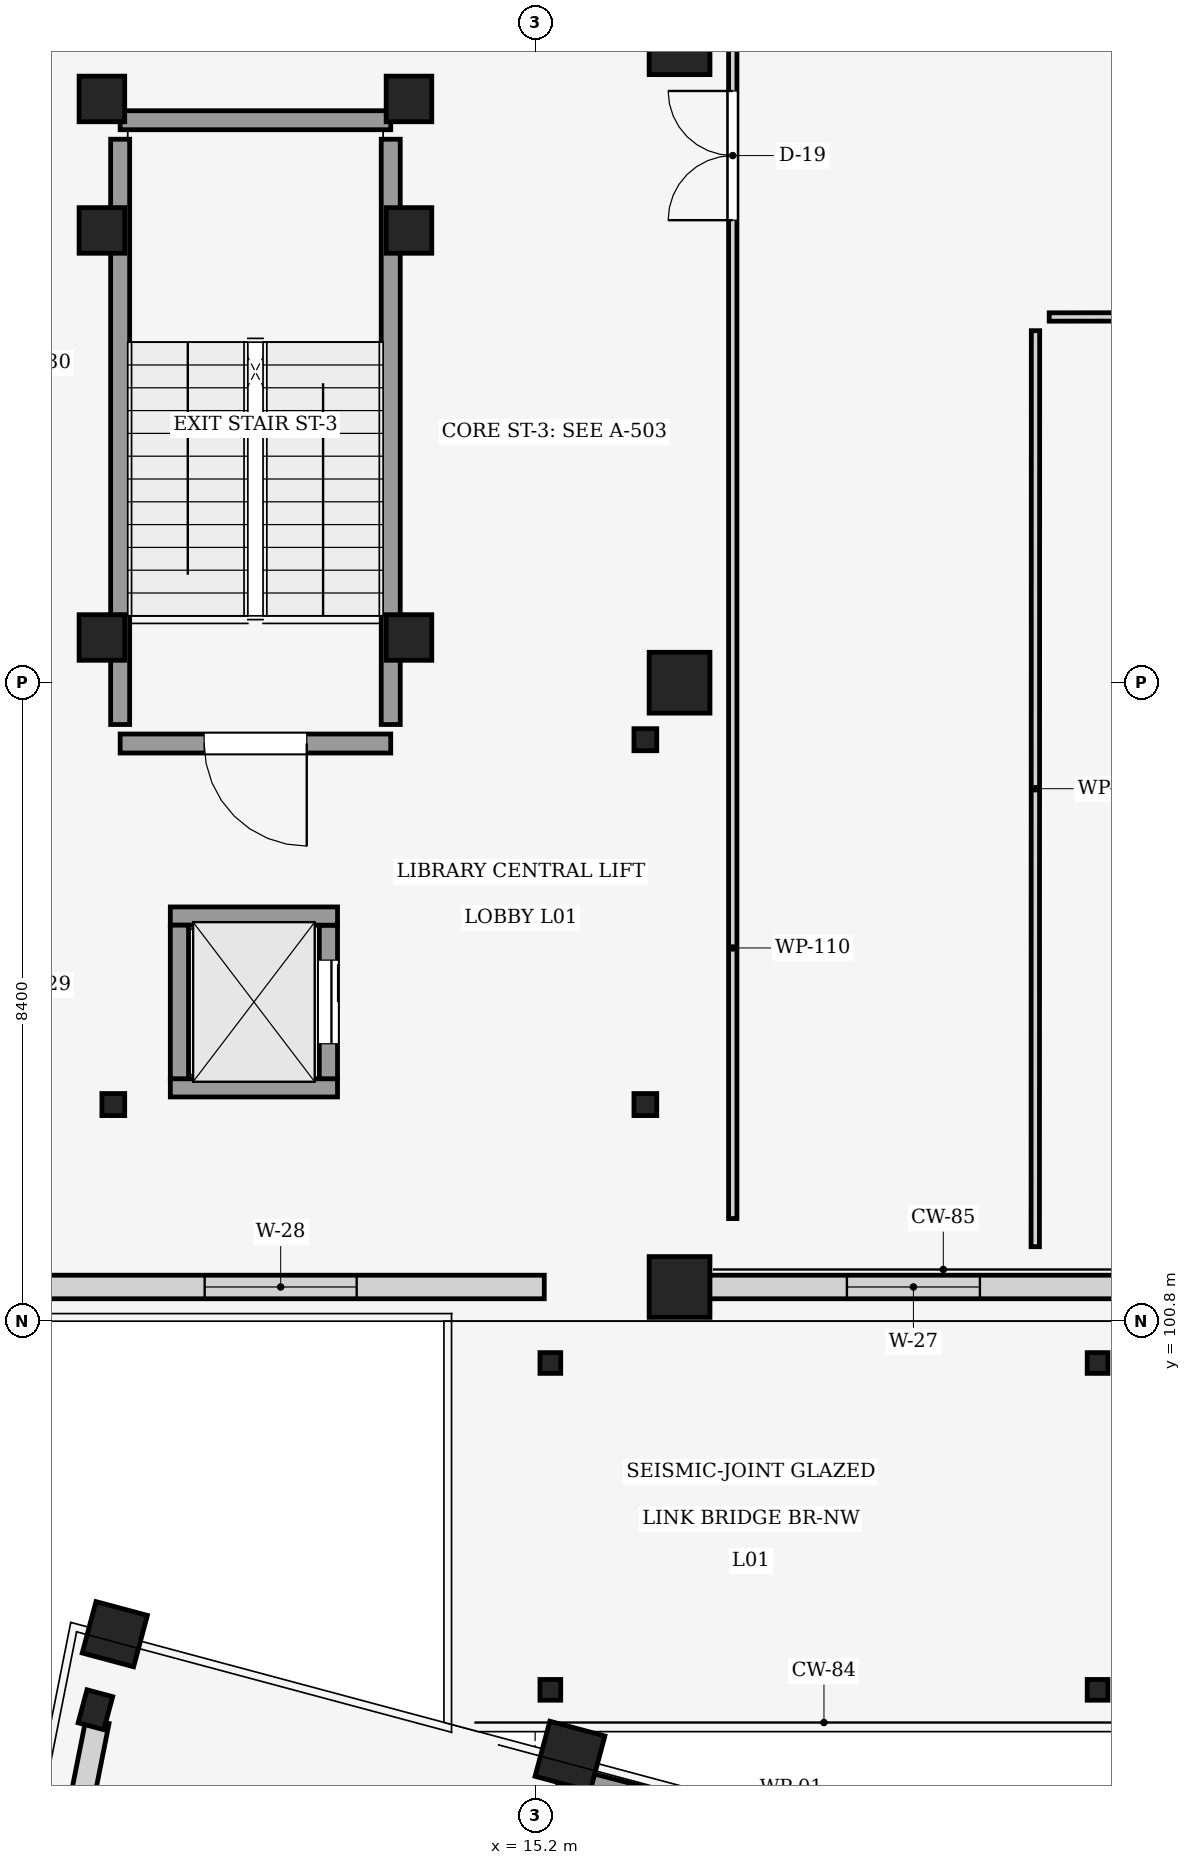
"""IFC4 building model, lengths in metres.
Left out: names, types, materials, properties, quantities, classifications, styles, units other than length and angle.
Written with IfcOpenShell. Run it as: python <this file> out.ifc"""

import sys

from ifc_helpers import new_model, si_unit, direction, frame, frame_2d, origin, origin_2d, place, context, subcontext, project, spatial, rectangle, circle, hollow_circle, i_section, extrude, element, fill, save


model = new_model("IFC4")
c1 = context("Model", 3, precision=1e-05, world=origin(), true_north=direction((0.0, 1.0)))
c2 = subcontext(c1, "Body", "Model", "MODEL_VIEW")
j1 = project(units=[si_unit("LENGTHUNIT", "METRE"), si_unit("PLANEANGLEUNIT", "RADIAN")], contexts=[c1])
p1 = place(None, origin())
s1 = spatial("IfcSite", under=j1, at=p1, CompositionType="ELEMENT")
p2 = place(p1, origin())
s2 = spatial("IfcBuilding", under=s1, at=p2, CompositionType="ELEMENT")
p3 = place(p2, frame((0.0, 0.0, 5.1)))
s3 = spatial("IfcBuildingStorey", under=s2, at=p3, CompositionType="ELEMENT", Elevation=5.1)
p4 = place(p3, frame((15.658, 95.077, 0.0), z_axis=(0.0, 0.0, 1.0), x_axis=(-0.965925826289, 0.258819045103, 0.0)))
e1 = element("IfcColumn", 1, at=p4, inside=s3, PredefinedType="COLUMN", context=c2, shape_type="SweptSolid", body=[
    extrude(circle(Radius=0.375, at=origin_2d()), origin(), (0.0, 0.0, 1.0), 4.05),
])
p5 = place(p3, frame((9.67, 96.682, 0.0), z_axis=(0.0, 0.0, 1.0), x_axis=(-0.965925826289, 0.258819045103, 0.0)))
e2 = element("IfcColumn", 2, at=p5, inside=s3, PredefinedType="COLUMN", context=c2, shape_type="SweptSolid", body=[
    extrude(rectangle(XDim=0.7, YDim=0.7, at=origin_2d()), origin(), (0.0, 0.0, 1.0), 4.05),
])
p6 = place(p3, frame((9.414, 95.688, 0.0), z_axis=(0.0, 0.0, 1.0), x_axis=(-0.965925826289, 0.258819045103, 0.0)))
e3 = element("IfcColumn", 3, at=p6, inside=s3, PredefinedType="PILASTER", context=c2, shape_type="SweptSolid", body=[
    extrude(rectangle(XDim=0.35, YDim=0.45, at=origin_2d()), origin(), (0.0, 0.0, 1.0), 4.05),
])
for number, where, z_axis, x_axis in (
    (4, (17.1, 101.25, 0.0), (0.0, 0.0, 1.0), (1.0, 0.0, 0.0)),
    (5, (17.1, 109.2, 0.0), (0.0, 0.0, 1.0), (1.0, 0.0, 0.0)),
    (6, (17.1, 117.6, 0.0), (0.0, 0.0, 1.0), (1.0, 0.0, 0.0)),
):
    element("IfcColumn", number, at=place(p3, frame(where, z_axis=z_axis, x_axis=x_axis)), inside=s3, PredefinedType="COLUMN", context=c2, shape_type="SweptSolid", body=[
        extrude(rectangle(XDim=0.8, YDim=0.8, at=origin_2d()), origin(), (0.0, 0.0, 1.0), 4.05),
    ])
for number, where, z_axis, x_axis in (
    (7, (15.4, 95.95, 0.0), (0.0, 0.0, 1.0), (1.0, 0.0, 0.0)),
    (8, (22.6, 95.95, 0.0), (0.0, 0.0, 1.0), (1.0, 0.0, 0.0)),
    (9, (22.6, 100.25, 0.0), (0.0, 0.0, 1.0), (1.0, 0.0, 0.0)),
    (10, (15.4, 100.25, 0.0), (0.0, 0.0, 1.0), (1.0, 0.0, 0.0)),
):
    element("IfcColumn", number, at=place(p3, frame(where, z_axis=z_axis, x_axis=x_axis)), inside=s3, PredefinedType="COLUMN", context=c2, shape_type="SweptSolid", body=[
        extrude(hollow_circle(Radius=0.136, WallThickness=0.016, at=origin_2d()), origin(), (0.0, 0.0, 1.0), 3.82),
    ])
for number, where, z_axis, x_axis in (
    (11, (13.54, 109.795, 0.0), (0.0, 0.0, 1.0), (1.0, 0.0, 0.0)),
    (12, (9.5, 109.795, 0.0), (0.0, 0.0, 1.0), (1.0, 0.0, 0.0)),
    (13, (13.54, 115.15, 0.0), (0.0, 0.0, 1.0), (1.0, 0.0, 0.0)),
    (14, (9.5, 115.15, 0.0), (0.0, 0.0, 1.0), (1.0, 0.0, 0.0)),
    (15, (13.54, 116.88, 0.0), (0.0, 0.0, 1.0), (1.0, 0.0, 0.0)),
    (16, (9.5, 116.88, 0.0), (0.0, 0.0, 1.0), (1.0, 0.0, 0.0)),
):
    element("IfcColumn", number, at=place(p3, frame(where, z_axis=z_axis, x_axis=x_axis)), inside=s3, PredefinedType="COLUMN", context=c2, shape_type="SweptSolid", body=[
        extrude(rectangle(XDim=0.6, YDim=0.6, at=origin_2d()), origin(), (0.0, 0.0, 1.0), 4.05),
    ])
for number, where, z_axis, x_axis in (
    (17, (9.65, 103.65, 0.0), (0.0, 0.0, 1.0), (1.0, 0.0, 0.0)),
    (18, (16.65, 103.65, 0.0), (0.0, 0.0, 1.0), (1.0, 0.0, 0.0)),
    (19, (16.65, 108.45, 0.0), (0.0, 0.0, 1.0), (1.0, 0.0, 0.0)),
):
    element("IfcColumn", number, at=place(p3, frame(where, z_axis=z_axis, x_axis=x_axis)), inside=s3, PredefinedType="COLUMN", context=c2, shape_type="SweptSolid", body=[
        extrude(i_section(OverallWidth=0.3, OverallDepth=0.29, WebThickness=0.009, FlangeThickness=0.014, at=origin_2d()), origin(), (0.0, 0.0, 1.0), 4.05),
    ])
p7 = place(p3, frame((8.476, 90.681, 0.0), z_axis=(0.0, 0.0, 1.0), x_axis=(0.195073176628, 0.980788690677, 0.0)))
e20 = element("IfcWall", 20, at=p7, inside=s3, PredefinedType="STANDARD", context=c2, shape_type="SweptSolid", body=[
    extrude(rectangle(XDim=4.952, YDim=0.31, at=frame_2d((2.476, 0.0))), origin(), (0.0, 0.0, 1.0), 3.145),
])
p8 = place(p7, frame((1.626, 0.0, 0.85)))
e21 = element("IfcOpeningElement", 21, at=p8, cuts=e20, PredefinedType="OPENING", context=c2, shape_type="SweptSolid", body=[
    extrude(rectangle(XDim=1.7, YDim=1.35, at=frame_2d((0.85, 0.675))), frame((0.0, 0.165, 0.0), z_axis=(0.0, -1.0, 0.0), x_axis=(1.0, 0.0, 0.0)), (0.0, 0.0, 1.0), 0.33),
])
p9 = place(p3, frame((15.515, 94.768, 0.0), z_axis=(0.0, 0.0, 1.0), x_axis=(0.967930025072, -0.251219956541, 0.0)))
e22 = element("IfcWall", 22, at=p9, inside=s3, PredefinedType="SHEAR", context=c2, shape_type="SweptSolid", body=[
    extrude(rectangle(XDim=6.31, YDim=0.38, at=frame_2d((3.155, 0.0))), origin(), (0.0, 0.0, 1.0), 3.75),
])
p10 = place(p3, frame((22.92, 101.25, 0.0), z_axis=(0.0, 0.0, 1.0), x_axis=(-1.0, 0.0, 0.0)))
e23 = element("IfcWall", 23, at=p10, inside=s3, PredefinedType="STANDARD", context=c2, shape_type="SweptSolid", body=[
    extrude(rectangle(XDim=5.485, YDim=0.31, at=frame_2d((2.742, 0.0))), origin(), (0.0, 0.0, 1.0), 2.995),
])
p11 = place(p10, frame((1.868, 0.0, 0.85)))
e24 = element("IfcOpeningElement", 24, at=p11, cuts=e23, PredefinedType="OPENING", context=c2, shape_type="SweptSolid", body=[
    extrude(rectangle(XDim=1.75, YDim=1.85, at=frame_2d((0.875, 0.925))), frame((0.0, 0.165, 0.0), z_axis=(0.0, -1.0, 0.0), x_axis=(1.0, 0.0, 0.0)), (0.0, 0.0, 1.0), 0.33),
])
p12 = place(p3, frame((15.32, 101.25, 0.0), z_axis=(0.0, 0.0, 1.0), x_axis=(-1.0, 0.0, 0.0)))
e25 = element("IfcWall", 25, at=p12, inside=s3, PredefinedType="STANDARD", context=c2, shape_type="SweptSolid", body=[
    extrude(rectangle(XDim=6.935, YDim=0.31, at=frame_2d((3.468, 0.0))), origin(), (0.0, 0.0, 1.0), 2.995),
])
p13 = place(p12, frame((2.468, 0.0, 0.85)))
e26 = element("IfcOpeningElement", 26, at=p13, cuts=e25, PredefinedType="OPENING", context=c2, shape_type="SweptSolid", body=[
    extrude(rectangle(XDim=2.0, YDim=1.85, at=frame_2d((1.0, 0.925))), frame((0.0, 0.165, 0.0), z_axis=(0.0, -1.0, 0.0), x_axis=(1.0, 0.0, 0.0)), (0.0, 0.0, 1.0), 0.33),
])
p14 = place(p3, frame((13.3, 108.4, 0.0), z_axis=(0.0, 0.0, 1.0), x_axis=(-1.0, 0.0, 0.0)))
e27 = element("IfcWall", 27, at=p14, inside=s3, PredefinedType="SHEAR", context=c2, shape_type="SweptSolid", body=[
    extrude(rectangle(XDim=3.56, YDim=0.25, at=frame_2d((1.78, 0.0))), origin(), (0.0, 0.0, 1.0), 4.05),
])
p15 = place(p14, frame((1.105, 0.0, 0.0)))
e28 = element("IfcOpeningElement", 28, at=p15, cuts=e27, PredefinedType="OPENING", context=c2, shape_type="SweptSolid", body=[
    extrude(rectangle(XDim=1.35, YDim=2.2, at=frame_2d((0.675, 1.1))), frame((0.0, 0.135, 0.0), z_axis=(0.0, -1.0, 0.0), x_axis=(1.0, 0.0, 0.0)), (0.0, 0.0, 1.0), 0.27),
])
p16 = place(p3, frame((9.74, 108.65, 0.0), z_axis=(0.0, 0.0, 1.0), x_axis=(0.0, 1.0, 0.0)))
e29 = element("IfcWall", 29, at=p16, inside=s3, PredefinedType="SHEAR", context=c2, shape_type="SweptSolid", body=[
    extrude(rectangle(XDim=7.7, YDim=0.25, at=frame_2d((3.85, 0.0))), origin(), (0.0, 0.0, 1.0), 4.05),
])
p17 = place(p3, frame((9.74, 116.6, 0.0), z_axis=(0.0, 0.0, 1.0), x_axis=(1.0, 0.0, 0.0)))
e30 = element("IfcWall", 30, at=p17, inside=s3, PredefinedType="SHEAR", context=c2, shape_type="SweptSolid", body=[
    extrude(rectangle(XDim=3.56, YDim=0.25, at=frame_2d((1.78, 0.0))), origin(), (0.0, 0.0, 1.0), 4.05),
])
p18 = place(p3, frame((13.3, 116.35, 0.0), z_axis=(0.0, 0.0, 1.0), x_axis=(0.0, -1.0, 0.0)))
e31 = element("IfcWall", 31, at=p18, inside=s3, PredefinedType="SHEAR", context=c2, shape_type="SweptSolid", body=[
    extrude(rectangle(XDim=7.7, YDim=0.25, at=frame_2d((3.85, 0.0))), origin(), (0.0, 0.0, 1.0), 4.05),
])
p19 = place(p3, frame((12.6, 103.87, 0.0), z_axis=(0.0, 0.0, 1.0), x_axis=(-1.0, 0.0, 0.0)))
e32 = element("IfcWall", 32, at=p19, inside=s3, PredefinedType="SHEAR", context=c2, shape_type="SweptSolid", body=[
    extrude(rectangle(XDim=2.2, YDim=0.24, at=frame_2d((1.1, 0.0))), origin(), (0.0, 0.0, 1.0), 4.05),
])
p20 = place(p3, frame((12.48, 106.01, 0.0), z_axis=(0.0, 0.0, 1.0), x_axis=(0.0, -1.0, 0.0)))
e33 = element("IfcWall", 33, at=p20, inside=s3, PredefinedType="SHEAR", context=c2, shape_type="SweptSolid", body=[
    extrude(rectangle(XDim=2.02, YDim=0.24, at=frame_2d((1.01, 0.0))), origin(), (0.0, 0.0, 1.0), 4.05),
])
p21 = place(p20, frame((0.46, 0.0, 0.0)))
e34 = element("IfcOpeningElement", 34, at=p21, cuts=e33, PredefinedType="OPENING", context=c2, shape_type="SweptSolid", body=[
    extrude(rectangle(XDim=1.1, YDim=2.15, at=frame_2d((0.55, 1.075))), frame((0.0, 0.13, 0.0), z_axis=(0.0, -1.0, 0.0), x_axis=(1.0, 0.0, 0.0)), (0.0, 0.0, 1.0), 0.26),
])
p22 = place(p3, frame((10.4, 106.13, 0.0), z_axis=(0.0, 0.0, 1.0), x_axis=(1.0, 0.0, 0.0)))
e35 = element("IfcWall", 35, at=p22, inside=s3, PredefinedType="SHEAR", context=c2, shape_type="SweptSolid", body=[
    extrude(rectangle(XDim=2.2, YDim=0.24, at=frame_2d((1.1, 0.0))), origin(), (0.0, 0.0, 1.0), 4.05),
])
p23 = place(p3, frame((10.52, 103.99, 0.0), z_axis=(0.0, 0.0, 1.0), x_axis=(0.0, 1.0, 0.0)))
e36 = element("IfcWall", 36, at=p23, inside=s3, PredefinedType="SHEAR", context=c2, shape_type="SweptSolid", body=[
    extrude(rectangle(XDim=2.02, YDim=0.24, at=frame_2d((1.01, 0.0))), origin(), (0.0, 0.0, 1.0), 4.05),
])
p24 = place(p3, frame((17.8, 102.15, 0.0), z_axis=(0.0, 0.0, 1.0), x_axis=(0.0, 1.0, 0.0)))
e37 = element("IfcWall", 37, at=p24, inside=s3, PredefinedType="PARTITIONING", context=c2, shape_type="SweptSolid", body=[
    extrude(rectangle(XDim=29.67, YDim=0.11, at=frame_2d((14.835, 0.0))), origin(), (0.0, 0.0, 1.0), 2.995),
])
p25 = place(p24, frame((13.135, 0.0, 0.0)))
e38 = element("IfcOpeningElement", 38, at=p25, cuts=e37, PredefinedType="OPENING", context=c2, shape_type="SweptSolid", body=[
    extrude(rectangle(XDim=1.7, YDim=2.35, at=frame_2d((0.85, 1.175))), frame((0.0, 0.065, 0.0), z_axis=(0.0, -1.0, 0.0), x_axis=(1.0, 0.0, 0.0)), (0.0, 0.0, 1.0), 0.13),
])
p26 = place(p3, frame((29.62, 114.02, 0.0), z_axis=(0.0, 0.0, 1.0), x_axis=(-0.999999377272, -0.00111599956, 0.0)))
e39 = element("IfcWall", 39, at=p26, inside=s3, PredefinedType="PARTITIONING", context=c2, shape_type="SweptSolid", body=[
    extrude(rectangle(XDim=7.657, YDim=0.11, at=frame_2d((3.828, 0.0))), origin(), (0.0, 0.0, 1.0), 3.145),
])
p27 = place(p3, frame((21.78, 101.78, 0.0), z_axis=(0.0, 0.0, 1.0), x_axis=(0.000263365806, 0.999999965319, 0.0)))
e40 = element("IfcWall", 40, at=p27, inside=s3, PredefinedType="PARTITIONING", context=c2, shape_type="SweptSolid", body=[
    extrude(rectangle(XDim=12.051, YDim=0.11, at=frame_2d((6.025, 0.0))), origin(), (0.0, 0.0, 1.0), 2.995),
])
p28 = place(p11, origin())
e41 = element("IfcWindow", 41, at=p28, inside=s3, PartitioningType="SINGLE_PANEL", PredefinedType="WINDOW", context=c2, shape_type="SweptSolid", body=[
    extrude(rectangle(XDim=1.75, YDim=1.85, at=frame_2d((0.875, 0.925))), frame((0.0, 0.03, 0.0), z_axis=(0.0, -1.0, 0.0), x_axis=(1.0, 0.0, 0.0)), (0.0, 0.0, 1.0), 0.06),
])
fill(e24, e41)
p29 = place(p13, origin())
e42 = element("IfcWindow", 42, at=p29, inside=s3, PartitioningType="SINGLE_PANEL", PredefinedType="WINDOW", context=c2, shape_type="SweptSolid", body=[
    extrude(rectangle(XDim=2.0, YDim=1.85, at=frame_2d((1.0, 0.925))), frame((0.0, 0.03, 0.0), z_axis=(0.0, -1.0, 0.0), x_axis=(1.0, 0.0, 0.0)), (0.0, 0.0, 1.0), 0.06),
])
fill(e26, e42)
p30 = place(p15, origin())
e43 = element("IfcDoor", 43, at=p30, inside=s3, OperationType="SINGLE_SWING_LEFT", PredefinedType="DOOR", context=c2, shape_type="SweptSolid", body=[
    extrude(rectangle(XDim=1.35, YDim=2.2, at=frame_2d((0.675, 1.1))), frame((0.0, 0.025, 0.0), z_axis=(0.0, -1.0, 0.0), x_axis=(1.0, 0.0, 0.0)), (0.0, 0.0, 1.0), 0.05),
])
fill(e28, e43)
p31 = place(p21, origin())
e44 = element("IfcDoor", 44, at=p31, inside=s3, OperationType="SLIDING_TO_LEFT", PredefinedType="DOOR", context=c2, shape_type="SweptSolid", body=[
    extrude(rectangle(XDim=1.1, YDim=2.15, at=frame_2d((0.55, 1.075))), frame((0.0, 0.025, 0.0), z_axis=(0.0, -1.0, 0.0), x_axis=(1.0, 0.0, 0.0)), (0.0, 0.0, 1.0), 0.05),
])
fill(e34, e44)
p32 = place(p25, origin())
e45 = element("IfcDoor", 45, at=p32, inside=s3, OperationType="DOUBLE_DOOR_SINGLE_SWING", PredefinedType="DOOR", context=c2, shape_type="SweptSolid", body=[
    extrude(rectangle(XDim=1.7, YDim=2.35, at=frame_2d((0.85, 1.175))), frame((0.0, 0.025, 0.0), z_axis=(0.0, -1.0, 0.0), x_axis=(1.0, 0.0, 0.0)), (0.0, 0.0, 1.0), 0.05),
])
fill(e38, e45)
save(model, sys.argv[1])
